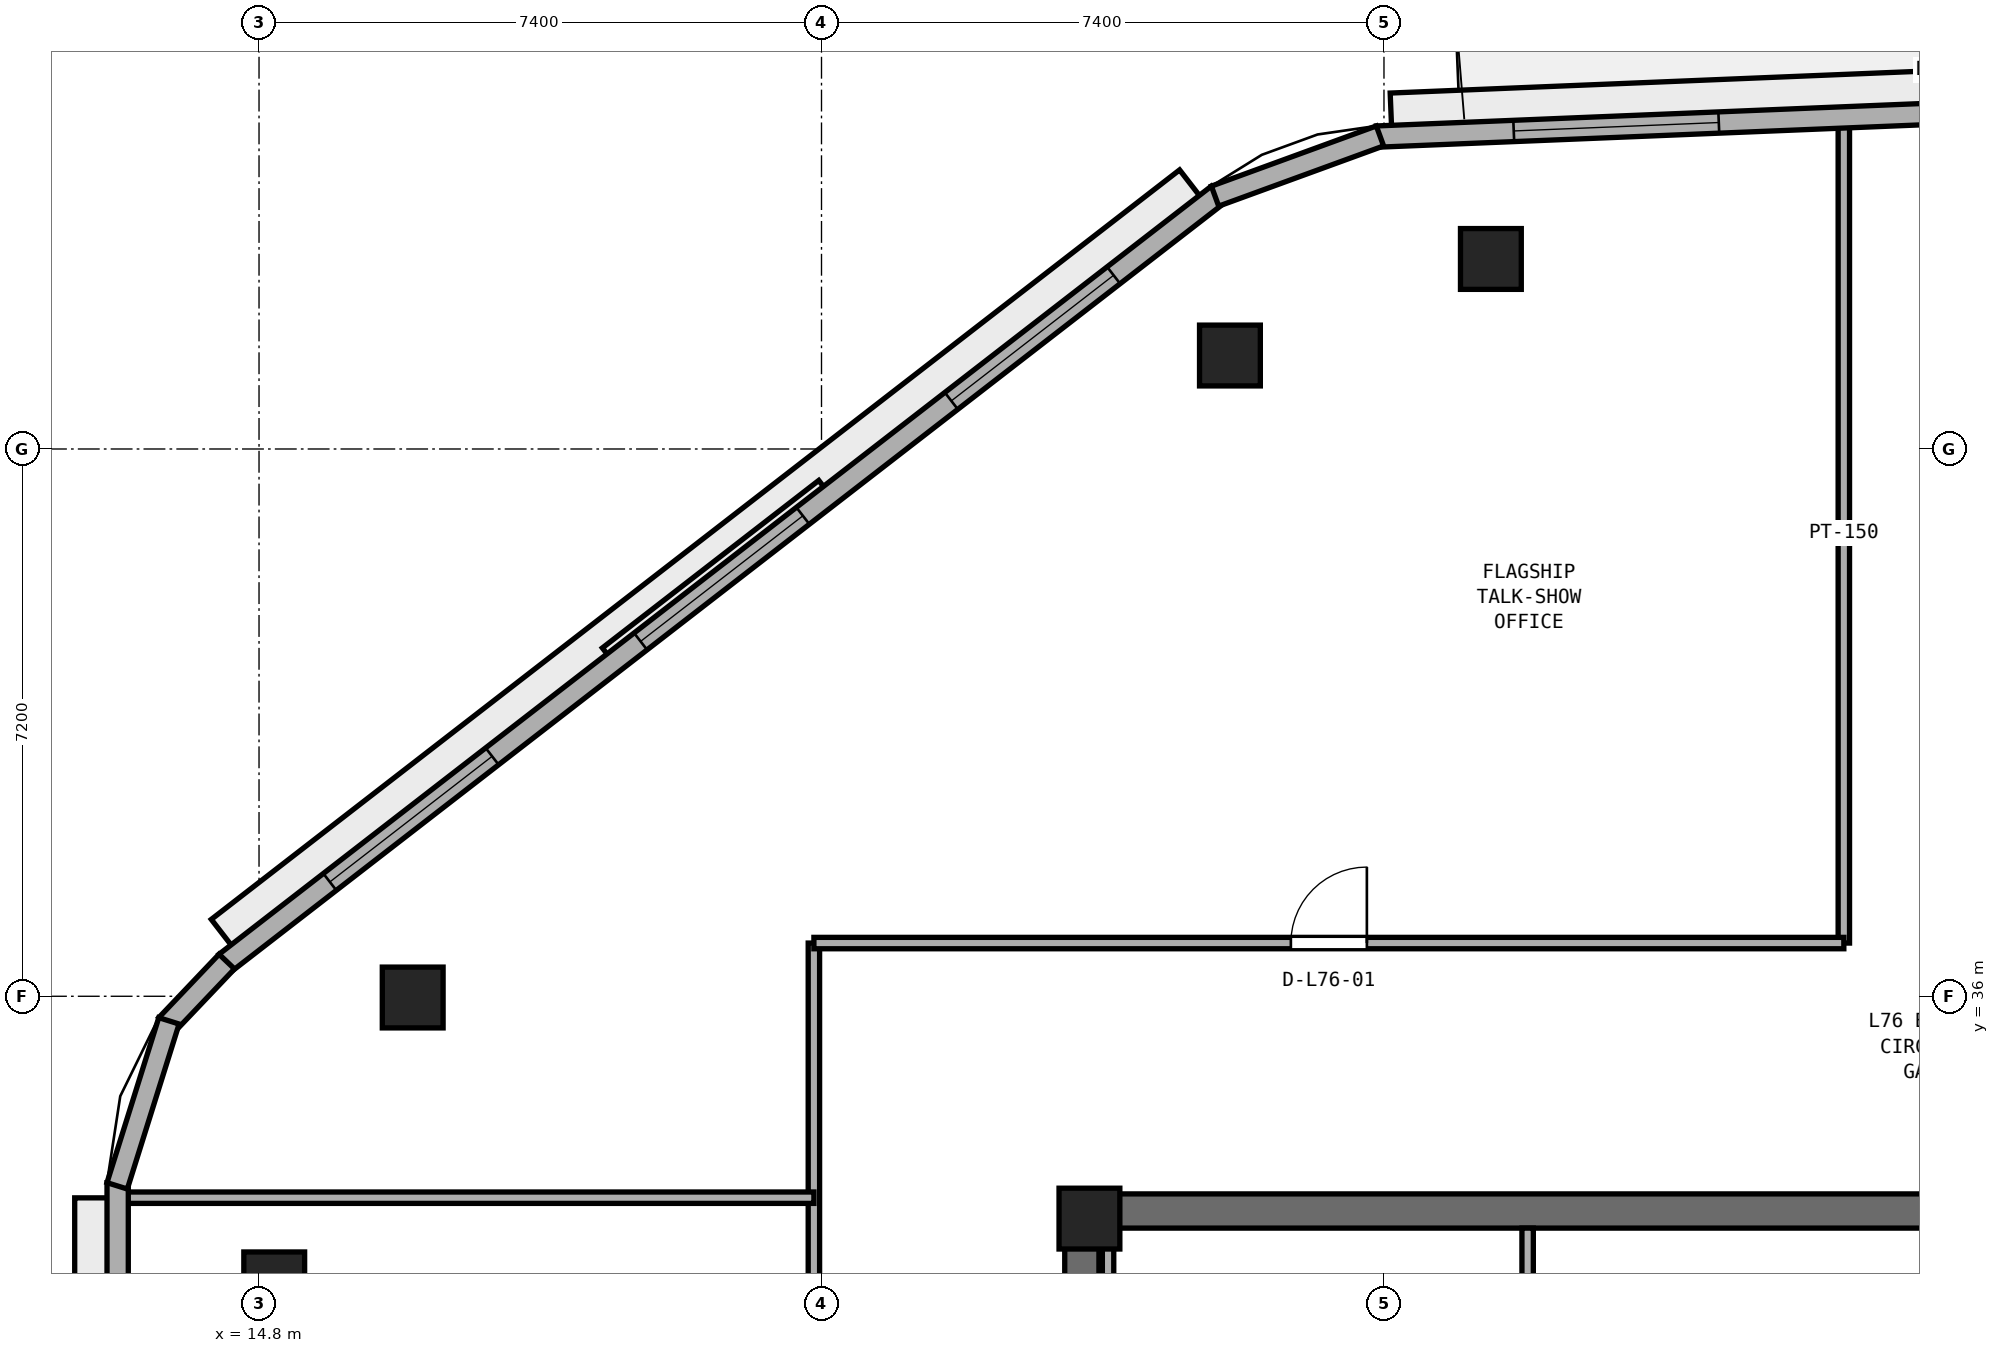
"""IFC4 building model, lengths in metres.
Left out: names, types, materials, properties, quantities, classifications, styles, units other than length and angle.
Written with IfcOpenShell. Run it as: python <this file> out.ifc"""

import sys

from ifc_helpers import new_model, si_unit, direction, frame, frame_2d, origin, origin_2d, place, context, subcontext, project, spatial, rectangle, extrude, element, fill, save


model = new_model("IFC4")
c1 = context("Model", 3, precision=1e-05, world=origin(), true_north=direction((0.0, 1.0)))
c2 = subcontext(c1, "Body", "Model", "MODEL_VIEW")
j1 = project(units=[si_unit("LENGTHUNIT", "METRE"), si_unit("PLANEANGLEUNIT", "RADIAN")], contexts=[c1])
p1 = place(None, origin())
s1 = spatial("IfcSite", under=j1, at=p1, CompositionType="ELEMENT")
p2 = place(p1, origin())
s2 = spatial("IfcBuilding", under=s1, at=p2, CompositionType="ELEMENT")
p3 = place(p2, frame((0.0, 0.0, 297.2)))
s3 = spatial("IfcBuildingStorey", under=s2, at=p3, CompositionType="ELEMENT", Elevation=297.2)
p4 = place(p3, frame((25.4, 33.175, 0.0), z_axis=(0.0, 0.0, 1.0), x_axis=(1.0, 0.0, 0.0)))
e1 = element("IfcWall", 1, at=p4, inside=s3, PredefinedType="SHEAR", context=c2, shape_type="SweptSolid", body=[
    extrude(rectangle(XDim=23.2, YDim=0.45, at=frame_2d((11.6, 0.0))), origin(), (0.0, 0.0, 1.0), 3.54),
])
p5 = place(p3, frame((25.625, 17.45, 0.0), z_axis=(0.0, 0.0, 1.0), x_axis=(0.0, 1.0, 0.0)))
e2 = element("IfcWall", 2, at=p5, inside=s3, PredefinedType="SHEAR", context=c2, shape_type="SweptSolid", body=[
    extrude(rectangle(XDim=15.5, YDim=0.45, at=frame_2d((7.75, 0.0))), origin(), (0.0, 0.0, 1.0), 3.54),
])
p6 = place(p5, frame((7.0, 0.0, 0.0)))
e3 = element("IfcOpeningElement", 3, at=p6, cuts=e2, PredefinedType="OPENING", context=c2, shape_type="SweptSolid", body=[
    extrude(rectangle(XDim=1.5, YDim=2.15, at=frame_2d((0.75, 1.075))), frame((0.0, 0.235, 0.0), z_axis=(0.0, -1.0, 0.0), x_axis=(1.0, 0.0, 0.0)), (0.0, 0.0, 1.0), 0.47),
])
p7 = place(p3, frame((25.725, 33.075, 0.0), z_axis=(0.0, 0.0, 1.0), x_axis=(1.0, 0.0, 0.0)))
e4 = element("IfcColumn", 4, at=p7, inside=s3, PredefinedType="PILASTER", context=c2, shape_type="SweptSolid", body=[
    extrude(rectangle(XDim=0.8, YDim=0.8, at=origin_2d()), origin(), (0.0, 0.0, 1.0), 3.8),
])
for number, where, z_axis, x_axis in (
    (5, (31.007, 45.7, 0.0), (0.0, 0.0, 1.0), (1.0, 0.0, 0.0)),
    (6, (27.573, 44.43, 0.0), (0.0, 0.0, 1.0), (1.0, 0.0, 0.0)),
    (7, (16.822, 35.984, 0.0), (0.0, 0.0, 1.0), (1.0, 0.0, 0.0)),
    (8, (15.0, 32.236, 0.0), (0.0, 0.0, 1.0), (1.0, 0.0, 0.0)),
):
    element("IfcColumn", number, at=place(p3, frame(where, z_axis=z_axis, x_axis=x_axis)), inside=s3, PredefinedType="COLUMN", context=c2, shape_type="SweptSolid", body=[
        extrude(rectangle(XDim=0.8, YDim=0.8, at=origin_2d()), origin(), (0.0, 0.0, 1.0), 3.8),
    ])
p8 = place(p3, frame((25.97, 30.65, 0.0), z_axis=(0.0, 0.0, 1.0), x_axis=(0.0, 1.0, 0.0)))
e9 = element("IfcWall", 9, at=p8, inside=s3, PredefinedType="PARTITIONING", context=c2, shape_type="SweptSolid", body=[
    extrude(rectangle(XDim=2.3, YDim=0.15, at=frame_2d((1.15, 0.0))), origin(), (0.0, 0.0, 1.0), 2.64),
])
p9 = place(p3, frame((31.49, 30.65, 0.0), z_axis=(0.0, 0.0, 1.0), x_axis=(0.0, 1.0, 0.0)))
e10 = element("IfcWall", 10, at=p9, inside=s3, PredefinedType="PARTITIONING", context=c2, shape_type="SweptSolid", body=[
    extrude(rectangle(XDim=2.3, YDim=0.15, at=frame_2d((1.15, 0.0))), origin(), (0.0, 0.0, 1.0), 3.54),
])
p10 = place(p3, frame((35.65, 36.7, 0.0), z_axis=(0.0, 0.0, 1.0), x_axis=(0.0, 1.0, 0.0)))
e11 = element("IfcWall", 11, at=p10, inside=s3, PredefinedType="PARTITIONING", context=c2, shape_type="SweptSolid", body=[
    extrude(rectangle(XDim=10.798, YDim=0.15, at=frame_2d((5.399, 0.0))), origin(), (0.0, 0.0, 1.0), 3.54),
])
p11 = place(p3, frame((22.1, 7.575, 0.0), z_axis=(0.0, 0.0, 1.0), x_axis=(0.0, 1.0, 0.0)))
e12 = element("IfcWall", 12, at=p11, inside=s3, PredefinedType="PARTITIONING", context=c2, shape_type="SweptSolid", body=[
    extrude(rectangle(XDim=29.125, YDim=0.15, at=frame_2d((14.562, 0.0))), origin(), (0.0, 0.0, 1.0), 3.54),
])
p12 = place(p11, frame((9.925, 0.0, 0.0)))
e13 = element("IfcOpeningElement", 13, at=p12, cuts=e12, PredefinedType="OPENING", context=c2, shape_type="SweptSolid", body=[
    extrude(rectangle(XDim=0.9, YDim=2.1, at=frame_2d((0.45, 1.05))), frame((0.0, 0.085, 0.0), z_axis=(0.0, -1.0, 0.0), x_axis=(1.0, 0.0, 0.0)), (0.0, 0.0, 1.0), 0.17),
])
p13 = place(p11, frame((19.75, 0.0, 0.0)))
e14 = element("IfcOpeningElement", 14, at=p13, cuts=e12, PredefinedType="OPENING", context=c2, shape_type="SweptSolid", body=[
    extrude(rectangle(XDim=0.9, YDim=2.1, at=frame_2d((0.45, 1.05))), frame((0.0, 0.085, 0.0), z_axis=(0.0, -1.0, 0.0), x_axis=(1.0, 0.0, 0.0)), (0.0, 0.0, 1.0), 0.17),
])
p14 = place(p3, frame((13.005, 33.35, 0.0), z_axis=(0.0, 0.0, 1.0), x_axis=(1.0, 0.0, 0.0)))
e15 = element("IfcWall", 15, at=p14, inside=s3, PredefinedType="PARTITIONING", context=c2, shape_type="SweptSolid", body=[
    extrude(rectangle(XDim=9.095, YDim=0.15, at=frame_2d((4.548, 0.0))), origin(), (0.0, 0.0, 1.0), 3.54),
])
p15 = place(p3, frame((22.1, 36.7, 0.0), z_axis=(0.0, 0.0, 1.0), x_axis=(1.0, 0.0, 0.0)))
e16 = element("IfcWall", 16, at=p15, inside=s3, PredefinedType="PARTITIONING", context=c2, shape_type="SweptSolid", body=[
    extrude(rectangle(XDim=13.55, YDim=0.15, at=frame_2d((6.775, 0.0))), origin(), (0.0, 0.0, 1.0), 3.54),
])
p16 = place(p15, frame((6.275, 0.0, 0.0)))
e17 = element("IfcOpeningElement", 17, at=p16, cuts=e16, PredefinedType="OPENING", context=c2, shape_type="SweptSolid", body=[
    extrude(rectangle(XDim=1.0, YDim=2.12, at=frame_2d((0.5, 1.06))), frame((0.0, 0.085, 0.0), z_axis=(0.0, -1.0, 0.0), x_axis=(1.0, 0.0, 0.0)), (0.0, 0.0, 1.0), 0.17),
])
p17 = place(p3, frame((46.414, 48.005, 0.0), z_axis=(0.0, 0.0, 1.0), x_axis=(-0.999156194126, -0.041071885021, 0.0)))
e18 = element("IfcWall", 18, at=p17, inside=s3, PredefinedType="STANDARD", context=c2, shape_type="SweptSolid", body=[
    extrude(rectangle(XDim=16.923, YDim=0.28, at=frame_2d((8.461, 0.0))), origin(), (0.0, 0.0, 1.0), 3.54),
])
p18 = place(p17, frame((8.562, 0.0, 0.0)))
e19 = element("IfcOpeningElement", 19, at=p18, cuts=e18, PredefinedType="OPENING", context=c2, shape_type="SweptSolid", body=[
    extrude(rectangle(XDim=1.1, YDim=2.2, at=frame_2d((0.55, 1.1))), frame((0.0, 0.15, 0.0), z_axis=(0.0, -1.0, 0.0), x_axis=(1.0, 0.0, 0.0)), (0.0, 0.0, 1.0), 0.3),
])
p19 = place(p17, frame((1.804, 0.0, 0.9)))
e20 = element("IfcOpeningElement", 20, at=p19, cuts=e18, PredefinedType="OPENING", context=c2, shape_type="SweptSolid", body=[
    extrude(rectangle(XDim=2.7, YDim=1.75, at=frame_2d((1.35, 0.875))), frame((0.0, 0.15, 0.0), z_axis=(0.0, -1.0, 0.0), x_axis=(1.0, 0.0, 0.0)), (0.0, 0.0, 1.0), 0.3),
])
p20 = place(p17, frame((12.419, 0.0, 0.9)))
e21 = element("IfcOpeningElement", 21, at=p20, cuts=e18, PredefinedType="OPENING", context=c2, shape_type="SweptSolid", body=[
    extrude(rectangle(XDim=2.7, YDim=1.75, at=frame_2d((1.35, 0.875))), frame((0.0, 0.15, 0.0), z_axis=(0.0, -1.0, 0.0), x_axis=(1.0, 0.0, 0.0)), (0.0, 0.0, 1.0), 0.3),
])
p21 = place(p3, frame((27.415, 46.547, 0.0), z_axis=(0.0, 0.0, 1.0), x_axis=(-0.790789745248, -0.612087884875, 0.0)))
e22 = element("IfcWall", 22, at=p21, inside=s3, PredefinedType="STANDARD", context=c2, shape_type="SweptSolid", body=[
    extrude(rectangle(XDim=16.509, YDim=0.28, at=frame_2d((8.254, 0.0))), origin(), (0.0, 0.0, 1.0), 3.54),
])
p22 = place(p21, frame((1.735, 0.0, 0.9)))
e23 = element("IfcOpeningElement", 23, at=p22, cuts=e22, PredefinedType="OPENING", context=c2, shape_type="SweptSolid", body=[
    extrude(rectangle(XDim=2.7, YDim=1.75, at=frame_2d((1.35, 0.875))), frame((0.0, 0.15, 0.0), z_axis=(0.0, -1.0, 0.0), x_axis=(1.0, 0.0, 0.0)), (0.0, 0.0, 1.0), 0.3),
])
p23 = place(p21, frame((6.905, 0.0, 0.9)))
e24 = element("IfcOpeningElement", 24, at=p23, cuts=e22, PredefinedType="OPENING", context=c2, shape_type="SweptSolid", body=[
    extrude(rectangle(XDim=2.7, YDim=1.75, at=frame_2d((1.35, 0.875))), frame((0.0, 0.15, 0.0), z_axis=(0.0, -1.0, 0.0), x_axis=(1.0, 0.0, 0.0)), (0.0, 0.0, 1.0), 0.3),
])
p24 = place(p21, frame((12.074, 0.0, 0.9)))
e25 = element("IfcOpeningElement", 25, at=p24, cuts=e22, PredefinedType="OPENING", context=c2, shape_type="SweptSolid", body=[
    extrude(rectangle(XDim=2.7, YDim=1.75, at=frame_2d((1.35, 0.875))), frame((0.0, 0.15, 0.0), z_axis=(0.0, -1.0, 0.0), x_axis=(1.0, 0.0, 0.0)), (0.0, 0.0, 1.0), 0.3),
])
p25 = place(p3, frame((12.94, 33.548, 0.0), z_axis=(0.0, 0.0, 1.0), x_axis=(0.0, -1.0, 0.0)))
e26 = element("IfcWall", 26, at=p25, inside=s3, PredefinedType="STANDARD", context=c2, shape_type="SweptSolid", body=[
    extrude(rectangle(XDim=17.496, YDim=0.28, at=frame_2d((8.748, 0.0))), origin(), (0.0, 0.0, 1.0), 3.54),
])
p26 = place(p25, frame((1.899, 0.0, 0.9)))
e27 = element("IfcOpeningElement", 27, at=p26, cuts=e26, PredefinedType="OPENING", context=c2, shape_type="SweptSolid", body=[
    extrude(rectangle(XDim=2.7, YDim=1.75, at=frame_2d((1.35, 0.875))), frame((0.0, 0.15, 0.0), z_axis=(0.0, -1.0, 0.0), x_axis=(1.0, 0.0, 0.0)), (0.0, 0.0, 1.0), 0.3),
])
p27 = place(p25, frame((7.398, 0.0, 0.9)))
e28 = element("IfcOpeningElement", 28, at=p27, cuts=e26, PredefinedType="OPENING", context=c2, shape_type="SweptSolid", body=[
    extrude(rectangle(XDim=2.7, YDim=1.75, at=frame_2d((1.35, 0.875))), frame((0.0, 0.15, 0.0), z_axis=(0.0, -1.0, 0.0), x_axis=(1.0, 0.0, 0.0)), (0.0, 0.0, 1.0), 0.3),
])
p28 = place(p25, frame((12.897, 0.0, 0.9)))
e29 = element("IfcOpeningElement", 29, at=p28, cuts=e26, PredefinedType="OPENING", context=c2, shape_type="SweptSolid", body=[
    extrude(rectangle(XDim=2.7, YDim=1.75, at=frame_2d((1.35, 0.875))), frame((0.0, 0.15, 0.0), z_axis=(0.0, -1.0, 0.0), x_axis=(1.0, 0.0, 0.0)), (0.0, 0.0, 1.0), 0.3),
])
p29 = place(p3, frame((29.547, 47.318, 0.0), z_axis=(0.0, 0.0, 1.0), x_axis=(-0.93940703724, -0.342803760748, 0.0)))
e30 = element("IfcWall", 30, at=p29, inside=s3, PredefinedType="STANDARD", context=c2, shape_type="SweptSolid", body=[
    extrude(rectangle(XDim=2.31, YDim=0.28, at=frame_2d((1.155, 0.0))), origin(), (0.0, 0.0, 1.0), 3.54),
])
p30 = place(p3, frame((14.375, 36.457, 0.0), z_axis=(0.0, 0.0, 1.0), x_axis=(-0.68895569752, -0.724803453948, 0.0)))
e31 = element("IfcWall", 31, at=p30, inside=s3, PredefinedType="STANDARD", context=c2, shape_type="SweptSolid", body=[
    extrude(rectangle(XDim=1.151, YDim=0.28, at=frame_2d((0.575, 0.0))), origin(), (0.0, 0.0, 1.0), 3.54),
])
p31 = place(p3, frame((13.615, 35.677, 0.0), z_axis=(0.0, 0.0, 1.0), x_axis=(-0.299374552426, -0.954135670311, 0.0)))
e32 = element("IfcWall", 32, at=p31, inside=s3, PredefinedType="STANDARD", context=c2, shape_type="SweptSolid", body=[
    extrude(rectangle(XDim=2.275, YDim=0.28, at=frame_2d((1.138, 0.0))), origin(), (0.0, 0.0, 1.0), 3.54),
])
p32 = place(p16, origin())
e33 = element("IfcDoor", 33, at=p32, inside=s3, OperationType="SINGLE_SWING_RIGHT", PredefinedType="DOOR", context=c2, shape_type="SweptSolid", body=[
    extrude(rectangle(XDim=1.0, YDim=2.12, at=frame_2d((0.5, 1.06))), frame((0.0, 0.025, 0.0), z_axis=(0.0, -1.0, 0.0), x_axis=(1.0, 0.0, 0.0)), (0.0, 0.0, 1.0), 0.05),
])
fill(e17, e33)
p33 = place(p20, origin())
e34 = element("IfcWindow", 34, at=p33, inside=s3, PartitioningType="SINGLE_PANEL", PredefinedType="WINDOW", context=c2, shape_type="SweptSolid", body=[
    extrude(rectangle(XDim=2.7, YDim=1.75, at=frame_2d((1.35, 0.875))), frame((0.0, 0.03, 0.0), z_axis=(0.0, -1.0, 0.0), x_axis=(1.0, 0.0, 0.0)), (0.0, 0.0, 1.0), 0.06),
])
fill(e21, e34)
p34 = place(p22, origin())
e35 = element("IfcWindow", 35, at=p34, inside=s3, PartitioningType="SINGLE_PANEL", PredefinedType="WINDOW", context=c2, shape_type="SweptSolid", body=[
    extrude(rectangle(XDim=2.7, YDim=1.75, at=frame_2d((1.35, 0.875))), frame((0.0, 0.03, 0.0), z_axis=(0.0, -1.0, 0.0), x_axis=(1.0, 0.0, 0.0)), (0.0, 0.0, 1.0), 0.06),
])
fill(e23, e35)
p35 = place(p23, origin())
e36 = element("IfcWindow", 36, at=p35, inside=s3, PartitioningType="SINGLE_PANEL", PredefinedType="WINDOW", context=c2, shape_type="SweptSolid", body=[
    extrude(rectangle(XDim=2.7, YDim=1.75, at=frame_2d((1.35, 0.875))), frame((0.0, 0.03, 0.0), z_axis=(0.0, -1.0, 0.0), x_axis=(1.0, 0.0, 0.0)), (0.0, 0.0, 1.0), 0.06),
])
fill(e24, e36)
p36 = place(p24, origin())
e37 = element("IfcWindow", 37, at=p36, inside=s3, PartitioningType="SINGLE_PANEL", PredefinedType="WINDOW", context=c2, shape_type="SweptSolid", body=[
    extrude(rectangle(XDim=2.7, YDim=1.75, at=frame_2d((1.35, 0.875))), frame((0.0, 0.03, 0.0), z_axis=(0.0, -1.0, 0.0), x_axis=(1.0, 0.0, 0.0)), (0.0, 0.0, 1.0), 0.06),
])
fill(e25, e37)
save(model, sys.argv[1])
